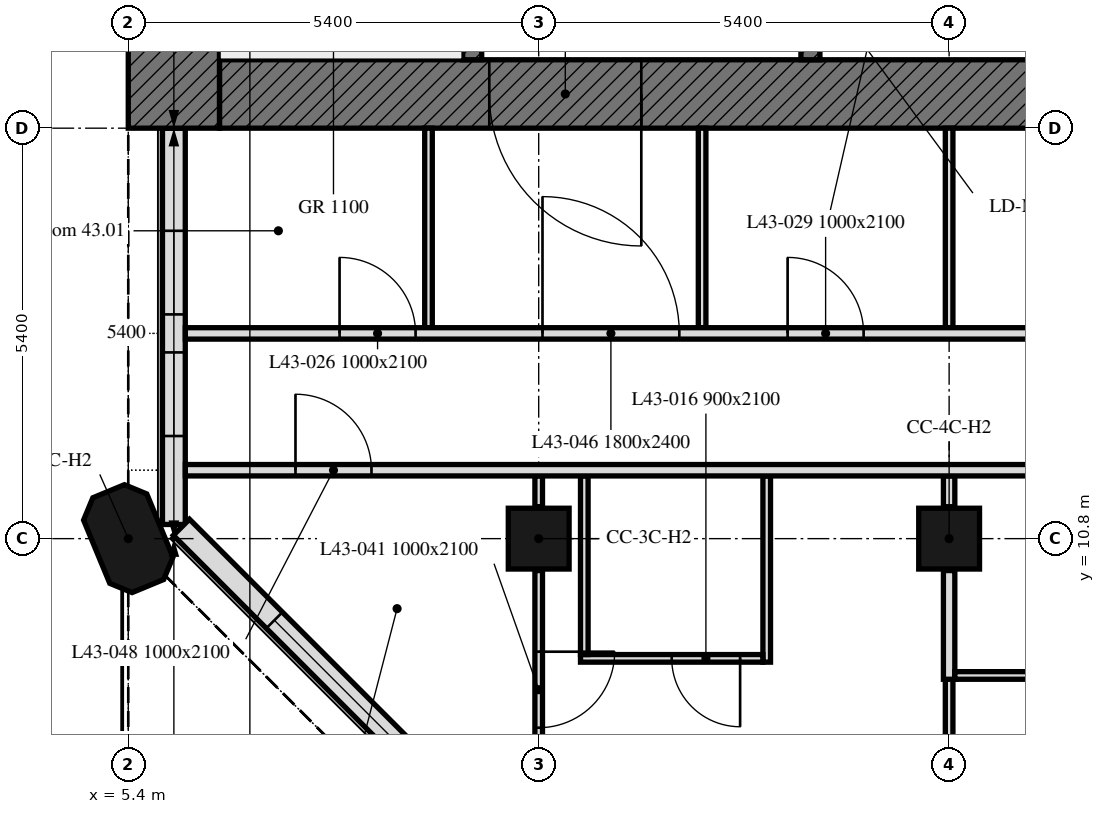
"""IFC4 building model, lengths in metres.
Left out: names, types, materials, properties, quantities, classifications, styles, units other than length and angle.
Written with IfcOpenShell. Run it as: python <this file> out.ifc"""

import sys

from ifc_helpers import new_model, si_unit, direction, frame, frame_2d, origin, origin_2d, place, context, subcontext, project, spatial, polyline, rectangle, outline, extrude, element, fill, save


model = new_model("IFC4")
c1 = context("Model", 3, precision=1e-05, world=origin(), true_north=direction((0.0, 1.0)))
c2 = subcontext(c1, "Body", "Model", "MODEL_VIEW")
j1 = project(units=[si_unit("LENGTHUNIT", "METRE"), si_unit("PLANEANGLEUNIT", "RADIAN")], contexts=[c1])
p1 = place(None, origin())
s1 = spatial("IfcSite", under=j1, at=p1, CompositionType="ELEMENT")
p2 = place(p1, origin())
s2 = spatial("IfcBuilding", under=s1, at=p2, CompositionType="ELEMENT")
p3 = place(p2, frame((0.0, 0.0, 180.7)))
s3 = spatial("IfcBuildingStorey", under=s2, at=p3, CompositionType="ELEMENT", Elevation=180.7)
p4 = place(p3, frame((5.4, 10.8, 0.0), z_axis=(0.0, 0.0, 1.0), x_axis=(-0.382683432365, 0.923879532511, 0.0)))
e1 = element("IfcColumn", 1, at=p4, inside=s3, PredefinedType="COLUMN", context=c2, shape_type="SweptSolid", body=[
    extrude(outline(polyline([(-0.45, -0.45), (0.45, -0.45), (0.675, -0.225), (0.675, 0.225), (0.45, 0.45), (-0.45, 0.45), (-0.675, 0.225), (-0.675, -0.225), (-0.45, -0.45)])), origin(), (0.0, 0.0, 1.0), 3.0),
])
for number, where, z_axis, x_axis in (
    (2, (10.8, 10.8, 0.0), (0.0, 0.0, 1.0), (1.0, 0.0, 0.0)),
    (3, (16.2, 10.8, 0.0), (0.0, 0.0, 1.0), (1.0, 0.0, 0.0)),
):
    element("IfcColumn", number, at=place(p3, frame(where, z_axis=z_axis, x_axis=x_axis)), inside=s3, PredefinedType="COLUMN", context=c2, shape_type="SweptSolid", body=[
        extrude(rectangle(XDim=0.8, YDim=0.8, at=origin_2d()), origin(), (0.0, 0.0, 1.0), 3.0),
    ])
p5 = place(p3, frame((6.0, 16.2, 0.0), z_axis=(0.0, 0.0, 1.0), x_axis=(0.0, -1.0, 0.0)))
e4 = element("IfcWall", 4, at=p5, inside=s3, PredefinedType="SOLIDWALL", context=c2, shape_type="SweptSolid", body=[
    extrude(rectangle(XDim=5.214, YDim=0.3, at=frame_2d((2.607, 0.0))), origin(), (0.0, 0.0, 1.0), 3.0),
])
p6 = place(p5, frame((1.35, 0.0, 0.9)))
e5 = element("IfcOpeningElement", 5, at=p6, cuts=e4, PredefinedType="OPENING", context=c2, shape_type="SweptSolid", body=[
    extrude(rectangle(XDim=1.1, YDim=1.7, at=frame_2d((0.55, 0.85))), frame((0.0, 0.16, 0.0), z_axis=(0.0, -1.0, 0.0), x_axis=(1.0, 0.0, 0.0)), (0.0, 0.0, 1.0), 0.32),
])
p7 = place(p5, frame((2.95, 0.0, 0.9)))
e6 = element("IfcOpeningElement", 6, at=p7, cuts=e4, PredefinedType="OPENING", context=c2, shape_type="SweptSolid", body=[
    extrude(rectangle(XDim=1.1, YDim=1.7, at=frame_2d((0.55, 0.85))), frame((0.0, 0.16, 0.0), z_axis=(0.0, -1.0, 0.0), x_axis=(1.0, 0.0, 0.0)), (0.0, 0.0, 1.0), 0.32),
])
p8 = place(p3, frame((6.099, 10.949, 0.0), z_axis=(0.0, 0.0, 1.0), x_axis=(0.707106781187, -0.707106781187, 0.0)))
e7 = element("IfcWall", 7, at=p8, inside=s3, PredefinedType="SOLIDWALL", context=c2, shape_type="SweptSolid", body=[
    extrude(rectangle(XDim=6.86, YDim=0.3, at=frame_2d((3.43, 0.0))), origin(), (0.0, 0.0, 1.0), 3.0),
])
p9 = place(p8, frame((1.73, 0.0, 0.9)))
e8 = element("IfcOpeningElement", 8, at=p9, cuts=e7, PredefinedType="OPENING", context=c2, shape_type="SweptSolid", body=[
    extrude(rectangle(XDim=3.4, YDim=1.7, at=frame_2d((1.7, 0.85))), frame((0.0, 0.16, 0.0), z_axis=(0.0, -1.0, 0.0), x_axis=(1.0, 0.0, 0.0)), (0.0, 0.0, 1.0), 0.32),
])
p10 = place(p3, frame((17.7, 16.65, 0.0), z_axis=(0.0, 0.0, 1.0), x_axis=(-1.0, 0.0, 0.0)))
e9 = element("IfcWall", 9, at=p10, inside=s3, PredefinedType="SOLIDWALL", context=c2, shape_type="SweptSolid", body=[
    extrude(rectangle(XDim=11.1, YDim=0.9, at=frame_2d((5.55, 0.0))), origin(), (0.0, 0.0, 1.0), 3.0),
])
p11 = place(p10, frame((5.55, 0.0, 0.0)))
e10 = element("IfcOpeningElement", 10, at=p11, cuts=e9, PredefinedType="OPENING", context=c2, shape_type="SweptSolid", body=[
    extrude(rectangle(XDim=2.0, YDim=2.4, at=frame_2d((1.0, 1.2))), frame((0.0, 0.45, 0.0), z_axis=(0.0, -1.0, 0.0), x_axis=(1.0, 0.0, 0.0)), (0.0, 0.0, 1.0), 0.9),
])
p12 = place(p3, frame((6.0, 16.2, 0.0), z_axis=(0.0, 0.0, 1.0), x_axis=(0.0, 1.0, 0.0)))
e11 = element("IfcWall", 11, at=p12, inside=s3, PredefinedType="SOLIDWALL", context=c2, shape_type="SweptSolid", body=[
    extrude(rectangle(XDim=16.2, YDim=1.2, at=frame_2d((8.1, 0.0))), origin(), (0.0, 0.0, 1.0), 3.0),
])
p13 = place(p3, frame((9.925, 17.1, 0.0), z_axis=(0.0, 0.0, 1.0), x_axis=(0.0, 1.0, 0.0)))
e12 = element("IfcWall", 12, at=p13, inside=s3, PredefinedType="SOLIDWALL", context=c2, shape_type="SweptSolid", body=[
    extrude(rectangle(XDim=14.4, YDim=0.25, at=frame_2d((7.2, 0.0))), origin(), (0.0, 0.0, 1.0), 3.0),
])
p14 = place(p13, frame((4.6, 0.0, 0.0)))
e13 = element("IfcOpeningElement", 13, at=p14, cuts=e12, PredefinedType="OPENING", context=c2, shape_type="SweptSolid", body=[
    extrude(rectangle(XDim=1.0, YDim=2.1, at=frame_2d((0.5, 1.05))), frame((0.0, 0.125, 0.0), z_axis=(0.0, -1.0, 0.0), x_axis=(1.0, 0.0, 0.0)), (0.0, 0.0, 1.0), 0.25),
])
p15 = place(p13, frame((7.062, 0.0, 0.0)))
e14 = element("IfcOpeningElement", 14, at=p15, cuts=e12, PredefinedType="OPENING", context=c2, shape_type="SweptSolid", body=[
    extrude(rectangle(XDim=1.2, YDim=2.1, at=frame_2d((0.6, 1.05))), frame((0.0, 0.125, 0.0), z_axis=(0.0, -1.0, 0.0), x_axis=(1.0, 0.0, 0.0)), (0.0, 0.0, 1.0), 0.25),
])
p16 = place(p13, frame((9.599, 0.0, 0.0)))
e15 = element("IfcOpeningElement", 15, at=p16, cuts=e12, PredefinedType="OPENING", context=c2, shape_type="SweptSolid", body=[
    extrude(rectangle(XDim=0.9, YDim=2.1, at=frame_2d((0.45, 1.05))), frame((0.0, 0.125, 0.0), z_axis=(0.0, -1.0, 0.0), x_axis=(1.0, 0.0, 0.0)), (0.0, 0.0, 1.0), 0.25),
])
p17 = place(p13, frame((11.032, 0.0, 0.0)))
e16 = element("IfcOpeningElement", 16, at=p17, cuts=e12, PredefinedType="OPENING", context=c2, shape_type="SweptSolid", body=[
    extrude(rectangle(XDim=0.9, YDim=2.1, at=frame_2d((0.45, 1.05))), frame((0.0, 0.125, 0.0), z_axis=(0.0, -1.0, 0.0), x_axis=(1.0, 0.0, 0.0)), (0.0, 0.0, 1.0), 0.25),
])
p18 = place(p13, frame((12.846, 0.0, 0.0)))
e17 = element("IfcOpeningElement", 17, at=p18, cuts=e12, PredefinedType="OPENING", context=c2, shape_type="SweptSolid", body=[
    extrude(rectangle(XDim=0.9, YDim=2.1, at=frame_2d((0.45, 1.05))), frame((0.0, 0.125, 0.0), z_axis=(0.0, -1.0, 0.0), x_axis=(1.0, 0.0, 0.0)), (0.0, 0.0, 1.0), 0.25),
])
p19 = place(p3, frame((14.375, 17.1, 0.0), z_axis=(0.0, 0.0, 1.0), x_axis=(0.0, 1.0, 0.0)))
e18 = element("IfcWall", 18, at=p19, inside=s3, PredefinedType="SOLIDWALL", context=c2, shape_type="SweptSolid", body=[
    extrude(rectangle(XDim=14.4, YDim=0.25, at=frame_2d((7.2, 0.0))), origin(), (0.0, 0.0, 1.0), 3.0),
])
p20 = place(p19, frame((13.15, 0.0, 0.0)))
e19 = element("IfcOpeningElement", 19, at=p20, cuts=e18, PredefinedType="OPENING", context=c2, shape_type="SweptSolid", body=[
    extrude(rectangle(XDim=1.0, YDim=2.1, at=frame_2d((0.5, 1.05))), frame((0.0, 0.125, 0.0), z_axis=(0.0, -1.0, 0.0), x_axis=(1.0, 0.0, 0.0)), (0.0, 0.0, 1.0), 0.25),
])
p21 = place(p19, frame((0.6, 0.0, 0.0)))
e20 = element("IfcOpeningElement", 20, at=p21, cuts=e18, PredefinedType="OPENING", context=c2, shape_type="SweptSolid", body=[
    extrude(rectangle(XDim=1.1, YDim=2.1, at=frame_2d((0.55, 1.05))), frame((0.0, 0.125, 0.0), z_axis=(0.0, -1.0, 0.0), x_axis=(1.0, 0.0, 0.0)), (0.0, 0.0, 1.0), 0.25),
])
p22 = place(p19, frame((3.25, 0.0, 0.0)))
e21 = element("IfcOpeningElement", 21, at=p22, cuts=e18, PredefinedType="OPENING", context=c2, shape_type="SweptSolid", body=[
    extrude(rectangle(XDim=0.9, YDim=2.1, at=frame_2d((0.45, 1.05))), frame((0.0, 0.125, 0.0), z_axis=(0.0, -1.0, 0.0), x_axis=(1.0, 0.0, 0.0)), (0.0, 0.0, 1.0), 0.25),
])
p23 = place(p3, frame((16.2, 6.151, 0.0), z_axis=(0.0, 0.0, 1.0), x_axis=(0.0, 1.0, 0.0)))
e22 = element("IfcWall", 22, at=p23, inside=s3, PredefinedType="PARTITIONING", context=c2, shape_type="SweptSolid", body=[
    extrude(rectangle(XDim=2.899, YDim=0.1, at=frame_2d((1.45, 0.0))), origin(), (0.0, 0.0, 1.0), 3.0),
])
p24 = place(p3, frame((16.2, 8.95, 0.0), z_axis=(0.0, 0.0, 1.0), x_axis=(0.0, 1.0, 0.0)))
e23 = element("IfcWall", 23, at=p24, inside=s3, PredefinedType="PARTITIONING", context=c2, shape_type="SweptSolid", body=[
    extrude(rectangle(XDim=1.43, YDim=0.15, at=frame_2d((0.715, 0.0))), origin(), (0.0, 0.0, 1.0), 3.0),
])
p25 = place(p3, frame((16.2, 11.22, 0.0), z_axis=(0.0, 0.0, 1.0), x_axis=(0.0, 1.0, 0.0)))
e24 = element("IfcWall", 24, at=p25, inside=s3, PredefinedType="PARTITIONING", context=c2, shape_type="SweptSolid", body=[
    extrude(rectangle(XDim=0.405, YDim=0.15, at=frame_2d((0.203, 0.0))), origin(), (0.0, 0.0, 1.0), 3.0),
])
p26 = place(p3, frame((13.8, 11.625, 0.0), z_axis=(0.0, 0.0, 1.0), x_axis=(0.0, -1.0, 0.0)))
e25 = element("IfcWall", 25, at=p26, inside=s3, PredefinedType="PARTITIONING", context=c2, shape_type="SweptSolid", body=[
    extrude(rectangle(XDim=2.45, YDim=0.1, at=frame_2d((1.225, 0.0))), origin(), (0.0, 0.0, 1.0), 3.0),
])
p27 = place(p3, frame((13.75, 9.225, 0.0), z_axis=(0.0, 0.0, 1.0), x_axis=(-1.0, 0.0, 0.0)))
e26 = element("IfcWall", 26, at=p27, inside=s3, PredefinedType="PARTITIONING", context=c2, shape_type="SweptSolid", body=[
    extrude(rectangle(XDim=2.4, YDim=0.1, at=frame_2d((1.2, 0.0))), origin(), (0.0, 0.0, 1.0), 3.0),
])
p28 = place(p27, frame((0.3, 0.0, 0.0)))
e27 = element("IfcOpeningElement", 27, at=p28, cuts=e26, PredefinedType="OPENING", context=c2, shape_type="SweptSolid", body=[
    extrude(rectangle(XDim=0.9, YDim=2.1, at=frame_2d((0.45, 1.05))), frame((0.0, 0.05, 0.0), z_axis=(0.0, -1.0, 0.0), x_axis=(1.0, 0.0, 0.0)), (0.0, 0.0, 1.0), 0.1),
])
p29 = place(p3, frame((11.4, 9.275, 0.0), z_axis=(0.0, 0.0, 1.0), x_axis=(0.0, 1.0, 0.0)))
e28 = element("IfcWall", 28, at=p29, inside=s3, PredefinedType="PARTITIONING", context=c2, shape_type="SweptSolid", body=[
    extrude(rectangle(XDim=2.35, YDim=0.1, at=frame_2d((1.175, 0.0))), origin(), (0.0, 0.0, 1.0), 3.0),
])
p30 = place(p3, frame((10.8, 11.625, 0.0), z_axis=(0.0, 0.0, 1.0), x_axis=(0.0, -1.0, 0.0)))
e29 = element("IfcWall", 29, at=p30, inside=s3, PredefinedType="PARTITIONING", context=c2, shape_type="SweptSolid", body=[
    extrude(rectangle(XDim=0.405, YDim=0.1, at=frame_2d((0.203, 0.0))), origin(), (0.0, 0.0, 1.0), 3.0),
])
p31 = place(p3, frame((10.8, 10.38, 0.0), z_axis=(0.0, 0.0, 1.0), x_axis=(0.0, -1.0, 0.0)))
e30 = element("IfcWall", 30, at=p31, inside=s3, PredefinedType="PARTITIONING", context=c2, shape_type="SweptSolid", body=[
    extrude(rectangle(XDim=3.868, YDim=0.1, at=frame_2d((1.934, 0.0))), origin(), (0.0, 0.0, 1.0), 3.0),
])
p32 = place(p31, frame((1.067, 0.0, 0.0)))
e31 = element("IfcOpeningElement", 31, at=p32, cuts=e30, PredefinedType="OPENING", context=c2, shape_type="SweptSolid", body=[
    extrude(rectangle(XDim=1.0, YDim=2.1, at=frame_2d((0.5, 1.05))), frame((0.0, 0.05, 0.0), z_axis=(0.0, -1.0, 0.0), x_axis=(1.0, 0.0, 0.0)), (0.0, 0.0, 1.0), 0.1),
])
p33 = place(p3, frame((16.275, 9.0, 0.0), z_axis=(0.0, 0.0, 1.0), x_axis=(1.0, 0.0, 0.0)))
e32 = element("IfcWall", 32, at=p33, inside=s3, PredefinedType="PARTITIONING", context=c2, shape_type="SweptSolid", body=[
    extrude(rectangle(XDim=4.375, YDim=0.1, at=frame_2d((2.188, 0.0))), origin(), (0.0, 0.0, 1.0), 3.0),
])
p34 = place(p33, frame((2.375, 0.0, 0.0)))
e33 = element("IfcOpeningElement", 33, at=p34, cuts=e32, PredefinedType="OPENING", context=c2, shape_type="SweptSolid", body=[
    extrude(rectangle(XDim=0.9, YDim=2.1, at=frame_2d((0.45, 1.05))), frame((0.0, 0.05, 0.0), z_axis=(0.0, -1.0, 0.0), x_axis=(1.0, 0.0, 0.0)), (0.0, 0.0, 1.0), 0.1),
])
p35 = place(p3, frame((6.151, 11.7, 0.0), z_axis=(0.0, 0.0, 1.0), x_axis=(1.0, 0.0, 0.0)))
e34 = element("IfcWall", 34, at=p35, inside=s3, PredefinedType="PARTITIONING", context=c2, shape_type="SweptSolid", body=[
    extrude(rectangle(XDim=41.698, YDim=0.15, at=frame_2d((20.849, 0.0))), origin(), (0.0, 0.0, 1.0), 3.0),
])
p36 = place(p35, frame((1.449, 0.0, 0.0)))
e35 = element("IfcOpeningElement", 35, at=p36, cuts=e34, PredefinedType="OPENING", context=c2, shape_type="SweptSolid", body=[
    extrude(rectangle(XDim=1.0, YDim=2.1, at=frame_2d((0.5, 1.05))), frame((0.0, 0.075, 0.0), z_axis=(0.0, -1.0, 0.0), x_axis=(1.0, 0.0, 0.0)), (0.0, 0.0, 1.0), 0.15),
])
p37 = place(p35, frame((37.954, 0.0, 0.0)))
e36 = element("IfcOpeningElement", 36, at=p37, cuts=e34, PredefinedType="OPENING", context=c2, shape_type="SweptSolid", body=[
    extrude(rectangle(XDim=1.0, YDim=2.1, at=frame_2d((0.5, 1.05))), frame((0.0, 0.075, 0.0), z_axis=(0.0, -1.0, 0.0), x_axis=(1.0, 0.0, 0.0)), (0.0, 0.0, 1.0), 0.15),
])
p38 = place(p35, frame((12.449, 0.0, 0.0)))
e37 = element("IfcOpeningElement", 37, at=p38, cuts=e34, PredefinedType="OPENING", context=c2, shape_type="SweptSolid", body=[
    extrude(rectangle(XDim=1.0, YDim=2.1, at=frame_2d((0.5, 1.05))), frame((0.0, 0.075, 0.0), z_axis=(0.0, -1.0, 0.0), x_axis=(1.0, 0.0, 0.0)), (0.0, 0.0, 1.0), 0.15),
])
p39 = place(p35, frame((23.249, 0.0, 0.0)))
e38 = element("IfcOpeningElement", 38, at=p39, cuts=e34, PredefinedType="OPENING", context=c2, shape_type="SweptSolid", body=[
    extrude(rectangle(XDim=1.0, YDim=2.1, at=frame_2d((0.5, 1.05))), frame((0.0, 0.075, 0.0), z_axis=(0.0, -1.0, 0.0), x_axis=(1.0, 0.0, 0.0)), (0.0, 0.0, 1.0), 0.15),
])
for number, where, z_axis, x_axis in (
    (39, (16.2, 16.2, 0.0), (0.0, 0.0, 1.0), (0.0, -1.0, 0.0)),
    (40, (9.35, 16.2, 0.0), (0.0, 0.0, 1.0), (0.0, -1.0, 0.0)),
    (41, (12.95, 13.575, 0.0), (0.0, 0.0, 1.0), (0.0, 1.0, 0.0)),
):
    element("IfcWall", number, at=place(p3, frame(where, z_axis=z_axis, x_axis=x_axis)), inside=s3, PredefinedType="PARTITIONING", context=c2, shape_type="SweptSolid", body=[
        extrude(rectangle(XDim=2.625, YDim=0.1, at=frame_2d((1.312, 0.0))), origin(), (0.0, 0.0, 1.0), 3.0),
    ])
p40 = place(p3, frame((6.151, 13.5, 0.0), z_axis=(0.0, 0.0, 1.0), x_axis=(1.0, 0.0, 0.0)))
e42 = element("IfcWall", 42, at=p40, inside=s3, PredefinedType="PARTITIONING", context=c2, shape_type="SweptSolid", body=[
    extrude(rectangle(XDim=36.974, YDim=0.15, at=frame_2d((18.487, 0.0))), origin(), (0.0, 0.0, 1.0), 3.0),
])
p41 = place(p40, frame((17.649, 0.0, 0.0)))
e43 = element("IfcOpeningElement", 43, at=p41, cuts=e42, PredefinedType="OPENING", context=c2, shape_type="SweptSolid", body=[
    extrude(rectangle(XDim=1.0, YDim=2.1, at=frame_2d((0.5, 1.05))), frame((0.0, 0.075, 0.0), z_axis=(0.0, -1.0, 0.0), x_axis=(1.0, 0.0, 0.0)), (0.0, 0.0, 1.0), 0.15),
])
p42 = place(p40, frame((2.029, 0.0, 0.0)))
e44 = element("IfcOpeningElement", 44, at=p42, cuts=e42, PredefinedType="OPENING", context=c2, shape_type="SweptSolid", body=[
    extrude(rectangle(XDim=1.0, YDim=2.1, at=frame_2d((0.5, 1.05))), frame((0.0, 0.075, 0.0), z_axis=(0.0, -1.0, 0.0), x_axis=(1.0, 0.0, 0.0)), (0.0, 0.0, 1.0), 0.15),
])
p43 = place(p40, frame((27.374, 0.0, 0.0)))
e45 = element("IfcOpeningElement", 45, at=p43, cuts=e42, PredefinedType="OPENING", context=c2, shape_type="SweptSolid", body=[
    extrude(rectangle(XDim=1.0, YDim=2.1, at=frame_2d((0.5, 1.05))), frame((0.0, 0.075, 0.0), z_axis=(0.0, -1.0, 0.0), x_axis=(1.0, 0.0, 0.0)), (0.0, 0.0, 1.0), 0.15),
])
p44 = place(p40, frame((34.574, 0.0, 0.0)))
e46 = element("IfcOpeningElement", 46, at=p44, cuts=e42, PredefinedType="OPENING", context=c2, shape_type="SweptSolid", body=[
    extrude(rectangle(XDim=1.0, YDim=2.1, at=frame_2d((0.5, 1.05))), frame((0.0, 0.075, 0.0), z_axis=(0.0, -1.0, 0.0), x_axis=(1.0, 0.0, 0.0)), (0.0, 0.0, 1.0), 0.15),
])
p45 = place(p40, frame((7.924, 0.0, 0.0)))
e47 = element("IfcOpeningElement", 47, at=p45, cuts=e42, PredefinedType="OPENING", context=c2, shape_type="SweptSolid", body=[
    extrude(rectangle(XDim=1.0, YDim=2.1, at=frame_2d((0.5, 1.05))), frame((0.0, 0.075, 0.0), z_axis=(0.0, -1.0, 0.0), x_axis=(1.0, 0.0, 0.0)), (0.0, 0.0, 1.0), 0.15),
])
p46 = place(p40, frame((4.699, 0.0, 0.0)))
e48 = element("IfcOpeningElement", 48, at=p46, cuts=e42, PredefinedType="OPENING", context=c2, shape_type="SweptSolid", body=[
    extrude(rectangle(XDim=1.8, YDim=2.4, at=frame_2d((0.9, 1.2))), frame((0.0, 0.075, 0.0), z_axis=(0.0, -1.0, 0.0), x_axis=(1.0, 0.0, 0.0)), (0.0, 0.0, 1.0), 0.15),
])
p47 = place(p40, frame((29.799, 0.0, 0.0)))
e49 = element("IfcOpeningElement", 49, at=p47, cuts=e42, PredefinedType="OPENING", context=c2, shape_type="SweptSolid", body=[
    extrude(rectangle(XDim=1.8, YDim=2.4, at=frame_2d((0.9, 1.2))), frame((0.0, 0.075, 0.0), z_axis=(0.0, -1.0, 0.0), x_axis=(1.0, 0.0, 0.0)), (0.0, 0.0, 1.0), 0.15),
])
p48 = place(p6, origin())
e50 = element("IfcWindow", 50, at=p48, inside=s3, PartitioningType="SINGLE_PANEL", PredefinedType="WINDOW", context=c2, shape_type="SweptSolid", body=[
    extrude(rectangle(XDim=1.1, YDim=1.7, at=frame_2d((0.55, 0.85))), frame((0.0, 0.03, 0.0), z_axis=(0.0, -1.0, 0.0), x_axis=(1.0, 0.0, 0.0)), (0.0, 0.0, 1.0), 0.06),
])
fill(e5, e50)
p49 = place(p7, origin())
e51 = element("IfcWindow", 51, at=p49, inside=s3, PartitioningType="SINGLE_PANEL", PredefinedType="WINDOW", context=c2, shape_type="SweptSolid", body=[
    extrude(rectangle(XDim=1.1, YDim=1.7, at=frame_2d((0.55, 0.85))), frame((0.0, 0.03, 0.0), z_axis=(0.0, -1.0, 0.0), x_axis=(1.0, 0.0, 0.0)), (0.0, 0.0, 1.0), 0.06),
])
fill(e6, e51)
p50 = place(p9, origin())
e52 = element("IfcWindow", 52, at=p50, inside=s3, PartitioningType="SINGLE_PANEL", PredefinedType="WINDOW", context=c2, shape_type="SweptSolid", body=[
    extrude(rectangle(XDim=3.4, YDim=1.7, at=frame_2d((1.7, 0.85))), frame((0.0, 0.03, 0.0), z_axis=(0.0, -1.0, 0.0), x_axis=(1.0, 0.0, 0.0)), (0.0, 0.0, 1.0), 0.06),
])
fill(e8, e52)
p51 = place(p11, origin())
e53 = element("IfcDoor", 53, at=p51, inside=s3, OperationType="DOUBLE_DOOR_SINGLE_SWING", PredefinedType="DOOR", context=c2, shape_type="SweptSolid", body=[
    extrude(rectangle(XDim=2.0, YDim=2.4, at=frame_2d((1.0, 1.2))), frame((0.0, 0.025, 0.0), z_axis=(0.0, -1.0, 0.0), x_axis=(1.0, 0.0, 0.0)), (0.0, 0.0, 1.0), 0.05),
])
fill(e10, e53)
p52 = place(p28, origin())
e54 = element("IfcDoor", 54, at=p52, inside=s3, OperationType="SINGLE_SWING_LEFT", PredefinedType="DOOR", context=c2, shape_type="SweptSolid", body=[
    extrude(rectangle(XDim=0.9, YDim=2.1, at=frame_2d((0.45, 1.05))), frame((0.0, 0.025, 0.0), z_axis=(0.0, -1.0, 0.0), x_axis=(1.0, 0.0, 0.0)), (0.0, 0.0, 1.0), 0.05),
])
fill(e27, e54)
p53 = place(p42, origin())
e55 = element("IfcDoor", 55, at=p53, inside=s3, OperationType="SINGLE_SWING_LEFT", PredefinedType="DOOR", context=c2, shape_type="SweptSolid", body=[
    extrude(rectangle(XDim=1.0, YDim=2.1, at=frame_2d((0.5, 1.05))), frame((0.0, 0.025, 0.0), z_axis=(0.0, -1.0, 0.0), x_axis=(1.0, 0.0, 0.0)), (0.0, 0.0, 1.0), 0.05),
])
fill(e44, e55)
p54 = place(p45, origin())
e56 = element("IfcDoor", 56, at=p54, inside=s3, OperationType="SINGLE_SWING_RIGHT", PredefinedType="DOOR", context=c2, shape_type="SweptSolid", body=[
    extrude(rectangle(XDim=1.0, YDim=2.1, at=frame_2d((0.5, 1.05))), frame((0.0, 0.025, 0.0), z_axis=(0.0, -1.0, 0.0), x_axis=(1.0, 0.0, 0.0)), (0.0, 0.0, 1.0), 0.05),
])
fill(e47, e56)
p55 = place(p32, origin())
e57 = element("IfcDoor", 57, at=p55, inside=s3, OperationType="SINGLE_SWING_LEFT", PredefinedType="DOOR", context=c2, shape_type="SweptSolid", body=[
    extrude(rectangle(XDim=1.0, YDim=2.1, at=frame_2d((0.5, 1.05))), frame((0.0, 0.025, 0.0), z_axis=(0.0, -1.0, 0.0), x_axis=(1.0, 0.0, 0.0)), (0.0, 0.0, 1.0), 0.05),
])
fill(e31, e57)
p56 = place(p46, origin())
e58 = element("IfcDoor", 58, at=p56, inside=s3, OperationType="DOUBLE_DOOR_SINGLE_SWING", PredefinedType="DOOR", context=c2, shape_type="SweptSolid", body=[
    extrude(rectangle(XDim=1.8, YDim=2.4, at=frame_2d((0.9, 1.2))), frame((0.0, 0.025, 0.0), z_axis=(0.0, -1.0, 0.0), x_axis=(1.0, 0.0, 0.0)), (0.0, 0.0, 1.0), 0.05),
])
fill(e48, e58)
p57 = place(p36, origin())
e59 = element("IfcDoor", 59, at=p57, inside=s3, OperationType="SINGLE_SWING_RIGHT", PredefinedType="DOOR", context=c2, shape_type="SweptSolid", body=[
    extrude(rectangle(XDim=1.0, YDim=2.1, at=frame_2d((0.5, 1.05))), frame((0.0, 0.025, 0.0), z_axis=(0.0, -1.0, 0.0), x_axis=(1.0, 0.0, 0.0)), (0.0, 0.0, 1.0), 0.05),
])
fill(e35, e59)
save(model, sys.argv[1])
